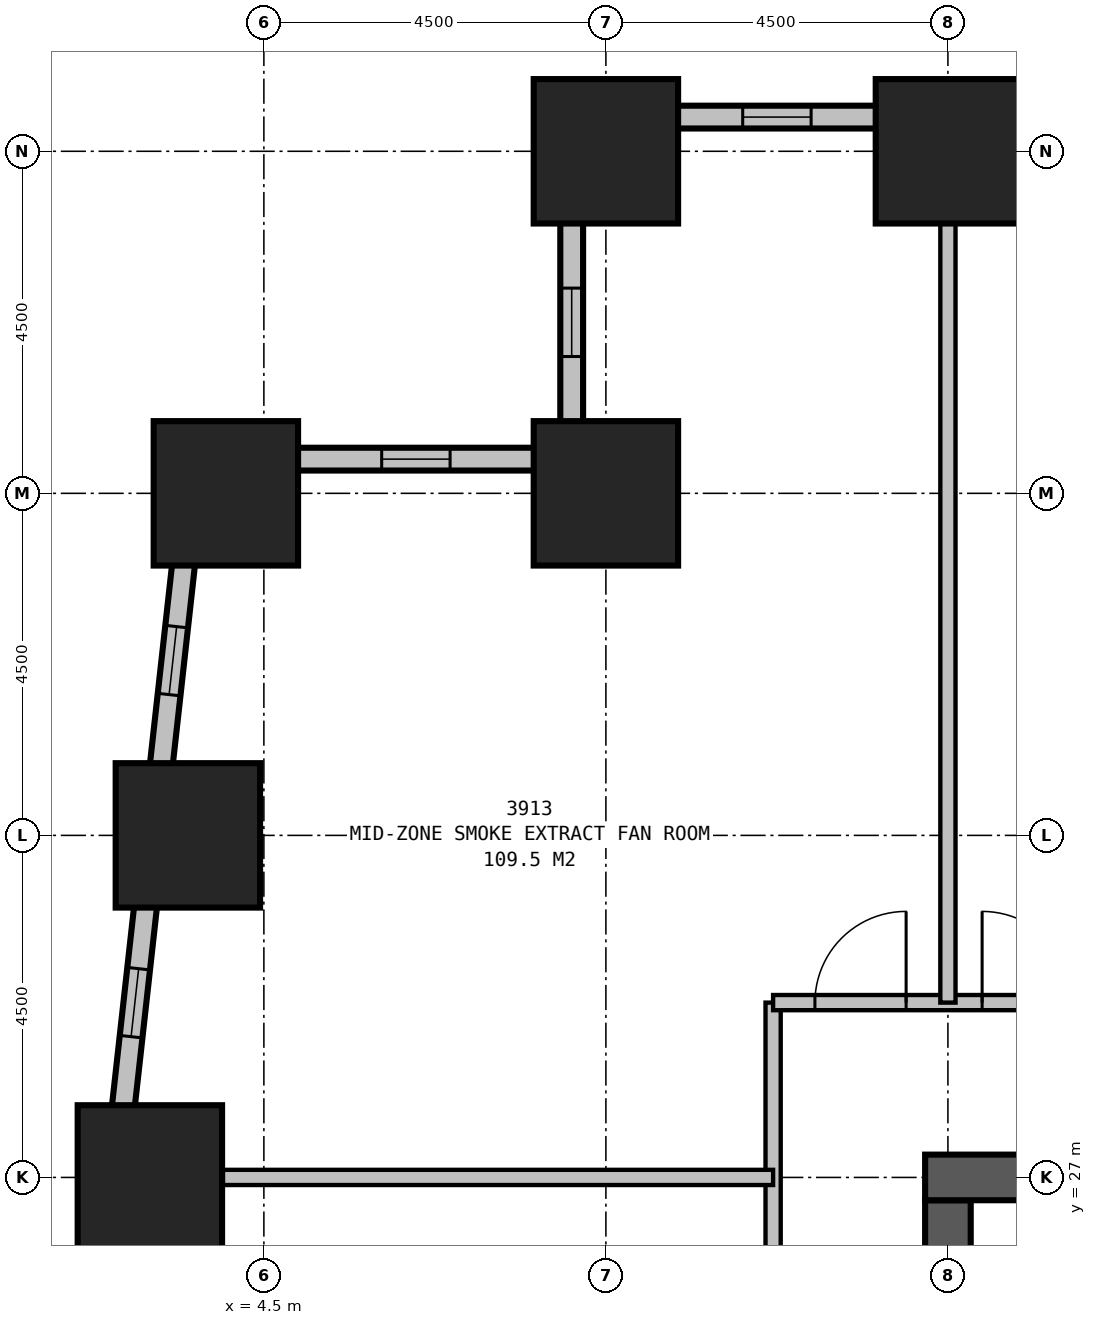
"""IFC4 building model, lengths in metres.
Left out: names, types, materials, properties, quantities, classifications, styles, units other than length and angle.
Written with IfcOpenShell. Run it as: python <this file> out.ifc"""

import sys

from ifc_helpers import new_model, si_unit, direction, frame, frame_2d, origin, origin_2d, place, context, subcontext, project, spatial, rectangle, extrude, element, fill, save


model = new_model("IFC4")
c1 = context("Model", 3, precision=1e-05, world=origin(), true_north=direction((0.0, 1.0)))
c2 = subcontext(c1, "Body", "Model", "MODEL_VIEW")
j1 = project(units=[si_unit("LENGTHUNIT", "METRE"), si_unit("PLANEANGLEUNIT", "RADIAN")], contexts=[c1])
p1 = place(None, origin())
s1 = spatial("IfcSite", under=j1, at=p1, CompositionType="ELEMENT")
p2 = place(p1, origin())
s2 = spatial("IfcBuilding", under=s1, at=p2, CompositionType="ELEMENT")
p3 = place(p2, frame((0.0, 0.0, 151.9)))
s3 = spatial("IfcBuildingStorey", under=s2, at=p3, CompositionType="ELEMENT", Elevation=151.9)
for number, where, z_axis, x_axis in (
    (1, (13.5, 40.5, 0.0), (0.0, 0.0, 1.0), (1.0, 0.0, 0.0)),
    (2, (9.0, 40.5, 0.0), (0.0, 0.0, 1.0), (1.0, 0.0, 0.0)),
    (3, (9.0, 36.0, 0.0), (0.0, 0.0, 1.0), (1.0, 0.0, 0.0)),
    (4, (4.0, 36.0, 0.0), (0.0, 0.0, 1.0), (1.0, 0.0, 0.0)),
    (5, (3.5, 31.5, 0.0), (0.0, 0.0, 1.0), (1.0, 0.0, 0.0)),
    (6, (3.0, 27.0, 0.0), (0.0, 0.0, 1.0), (1.0, 0.0, 0.0)),
):
    element("IfcColumn", number, at=place(p3, frame(where, z_axis=z_axis, x_axis=x_axis)), inside=s3, PredefinedType="COLUMN", context=c2, shape_type="SweptSolid", body=[
        extrude(rectangle(XDim=1.9, YDim=1.9, at=origin_2d()), origin(), (0.0, 0.0, 1.0), 6.0),
    ])
p4 = place(p3, frame((36.3, 27.0, 0.0), z_axis=(0.0, 0.0, 1.0), x_axis=(-1.0, 0.0, 0.0)))
e7 = element("IfcWall", 7, at=p4, inside=s3, PredefinedType="SHEAR", context=c2, shape_type="SweptSolid", body=[
    extrude(rectangle(XDim=23.1, YDim=0.6, at=frame_2d((11.55, 0.0))), origin(), (0.0, 0.0, 1.0), 6.0),
])
p5 = place(p4, frame((17.05, 0.0, 0.0)))
e8 = element("IfcOpeningElement", 8, at=p5, cuts=e7, PredefinedType="OPENING", context=c2, shape_type="SweptSolid", body=[
    extrude(rectangle(XDim=1.0, YDim=2.1, at=frame_2d((0.5, 1.05))), frame((0.0, 0.31, 0.0), z_axis=(0.0, -1.0, 0.0), x_axis=(1.0, 0.0, 0.0)), (0.0, 0.0, 1.0), 0.62),
])
p6 = place(p4, frame((12.05, 0.0, 0.0)))
e9 = element("IfcOpeningElement", 9, at=p6, cuts=e7, PredefinedType="OPENING", context=c2, shape_type="SweptSolid", body=[
    extrude(rectangle(XDim=1.0, YDim=2.1, at=frame_2d((0.5, 1.05))), frame((0.0, 0.31, 0.0), z_axis=(0.0, -1.0, 0.0), x_axis=(1.0, 0.0, 0.0)), (0.0, 0.0, 1.0), 0.62),
])
p7 = place(p4, frame((7.05, 0.0, 0.0)))
e10 = element("IfcOpeningElement", 10, at=p7, cuts=e7, PredefinedType="OPENING", context=c2, shape_type="SweptSolid", body=[
    extrude(rectangle(XDim=1.0, YDim=2.1, at=frame_2d((0.5, 1.05))), frame((0.0, 0.31, 0.0), z_axis=(0.0, -1.0, 0.0), x_axis=(1.0, 0.0, 0.0)), (0.0, 0.0, 1.0), 0.62),
])
p8 = place(p3, frame((13.5, 26.7, 0.0), z_axis=(0.0, 0.0, 1.0), x_axis=(0.0, -1.0, 0.0)))
e11 = element("IfcWall", 11, at=p8, inside=s3, PredefinedType="SHEAR", context=c2, shape_type="SweptSolid", body=[
    extrude(rectangle(XDim=6.7, YDim=0.6, at=frame_2d((3.35, 0.0))), origin(), (0.0, 0.0, 1.0), 6.0),
])
p9 = place(p3, frame((41.1, 40.95, 0.0), z_axis=(0.0, 0.0, 1.0), x_axis=(-1.0, 0.0, 0.0)))
e12 = element("IfcWall", 12, at=p9, inside=s3, PredefinedType="STANDARD", context=c2, shape_type="SweptSolid", body=[
    extrude(rectangle(XDim=32.7, YDim=0.3, at=frame_2d((16.35, 0.0))), origin(), (0.0, 0.0, 1.0), 3.35),
])
p10 = place(p9, frame((2.4, 0.0, 0.5)))
e13 = element("IfcOpeningElement", 13, at=p10, cuts=e12, PredefinedType="OPENING", context=c2, shape_type="SweptSolid", body=[
    extrude(rectangle(XDim=0.9, YDim=1.2, at=frame_2d((0.45, 0.6))), frame((0.0, 0.16, 0.0), z_axis=(0.0, -1.0, 0.0), x_axis=(1.0, 0.0, 0.0)), (0.0, 0.0, 1.0), 0.32),
])
p11 = place(p9, frame((6.9, 0.0, 0.5)))
e14 = element("IfcOpeningElement", 14, at=p11, cuts=e12, PredefinedType="OPENING", context=c2, shape_type="SweptSolid", body=[
    extrude(rectangle(XDim=0.9, YDim=1.2, at=frame_2d((0.45, 0.6))), frame((0.0, 0.16, 0.0), z_axis=(0.0, -1.0, 0.0), x_axis=(1.0, 0.0, 0.0)), (0.0, 0.0, 1.0), 0.32),
])
p12 = place(p9, frame((11.4, 0.0, 0.5)))
e15 = element("IfcOpeningElement", 15, at=p12, cuts=e12, PredefinedType="OPENING", context=c2, shape_type="SweptSolid", body=[
    extrude(rectangle(XDim=0.9, YDim=1.2, at=frame_2d((0.45, 0.6))), frame((0.0, 0.16, 0.0), z_axis=(0.0, -1.0, 0.0), x_axis=(1.0, 0.0, 0.0)), (0.0, 0.0, 1.0), 0.32),
])
p13 = place(p9, frame((15.9, 0.0, 0.5)))
e16 = element("IfcOpeningElement", 16, at=p13, cuts=e12, PredefinedType="OPENING", context=c2, shape_type="SweptSolid", body=[
    extrude(rectangle(XDim=0.9, YDim=1.2, at=frame_2d((0.45, 0.6))), frame((0.0, 0.16, 0.0), z_axis=(0.0, -1.0, 0.0), x_axis=(1.0, 0.0, 0.0)), (0.0, 0.0, 1.0), 0.32),
])
p14 = place(p9, frame((20.4, 0.0, 0.5)))
e17 = element("IfcOpeningElement", 17, at=p14, cuts=e12, PredefinedType="OPENING", context=c2, shape_type="SweptSolid", body=[
    extrude(rectangle(XDim=0.9, YDim=1.2, at=frame_2d((0.45, 0.6))), frame((0.0, 0.16, 0.0), z_axis=(0.0, -1.0, 0.0), x_axis=(1.0, 0.0, 0.0)), (0.0, 0.0, 1.0), 0.32),
])
p15 = place(p9, frame((24.9, 0.0, 0.5)))
e18 = element("IfcOpeningElement", 18, at=p15, cuts=e12, PredefinedType="OPENING", context=c2, shape_type="SweptSolid", body=[
    extrude(rectangle(XDim=0.9, YDim=1.2, at=frame_2d((0.45, 0.6))), frame((0.0, 0.16, 0.0), z_axis=(0.0, -1.0, 0.0), x_axis=(1.0, 0.0, 0.0)), (0.0, 0.0, 1.0), 0.32),
])
p16 = place(p9, frame((29.4, 0.0, 0.5)))
e19 = element("IfcOpeningElement", 19, at=p16, cuts=e12, PredefinedType="OPENING", context=c2, shape_type="SweptSolid", body=[
    extrude(rectangle(XDim=0.9, YDim=1.2, at=frame_2d((0.45, 0.6))), frame((0.0, 0.16, 0.0), z_axis=(0.0, -1.0, 0.0), x_axis=(1.0, 0.0, 0.0)), (0.0, 0.0, 1.0), 0.32),
])
p17 = place(p3, frame((8.55, 41.1, 0.0), z_axis=(0.0, 0.0, 1.0), x_axis=(0.0, -1.0, 0.0)))
e20 = element("IfcWall", 20, at=p17, inside=s3, PredefinedType="STANDARD", context=c2, shape_type="SweptSolid", body=[
    extrude(rectangle(XDim=4.8, YDim=0.3, at=frame_2d((2.4, 0.0))), origin(), (0.0, 0.0, 1.0), 3.35),
])
p18 = place(p17, frame((2.4, 0.0, 0.5)))
e21 = element("IfcOpeningElement", 21, at=p18, cuts=e20, PredefinedType="OPENING", context=c2, shape_type="SweptSolid", body=[
    extrude(rectangle(XDim=0.9, YDim=1.2, at=frame_2d((0.45, 0.6))), frame((0.0, 0.16, 0.0), z_axis=(0.0, -1.0, 0.0), x_axis=(1.0, 0.0, 0.0)), (0.0, 0.0, 1.0), 0.32),
])
p19 = place(p3, frame((8.7, 36.45, 0.0), z_axis=(0.0, 0.0, 1.0), x_axis=(-1.0, 0.0, 0.0)))
e22 = element("IfcWall", 22, at=p19, inside=s3, PredefinedType="STANDARD", context=c2, shape_type="SweptSolid", body=[
    extrude(rectangle(XDim=5.253, YDim=0.3, at=frame_2d((2.626, 0.0))), origin(), (0.0, 0.0, 1.0), 3.35),
])
p20 = place(p19, frame((1.75, 0.0, 0.5)))
e23 = element("IfcOpeningElement", 23, at=p20, cuts=e22, PredefinedType="OPENING", context=c2, shape_type="SweptSolid", body=[
    extrude(rectangle(XDim=0.9, YDim=1.2, at=frame_2d((0.45, 0.6))), frame((0.0, 0.16, 0.0), z_axis=(0.0, -1.0, 0.0), x_axis=(1.0, 0.0, 0.0)), (0.0, 0.0, 1.0), 0.32),
])
p21 = place(p3, frame((3.614, 36.599, 0.0), z_axis=(0.0, 0.0, 1.0), x_axis=(-0.110429082637, -0.993884006164, 0.0)))
e24 = element("IfcWall", 24, at=p21, inside=s3, PredefinedType="STANDARD", context=c2, shape_type="SweptSolid", body=[
    extrude(rectangle(XDim=32.899, YDim=0.3, at=frame_2d((16.45, 0.0))), origin(), (0.0, 0.0, 1.0), 3.35),
])
p22 = place(p21, frame((2.367, 0.0, 0.5)))
e25 = element("IfcOpeningElement", 25, at=p22, cuts=e24, PredefinedType="OPENING", context=c2, shape_type="SweptSolid", body=[
    extrude(rectangle(XDim=0.9, YDim=1.2, at=frame_2d((0.45, 0.6))), frame((0.0, 0.16, 0.0), z_axis=(0.0, -1.0, 0.0), x_axis=(1.0, 0.0, 0.0)), (0.0, 0.0, 1.0), 0.32),
])
p23 = place(p21, frame((6.895, 0.0, 0.5)))
e26 = element("IfcOpeningElement", 26, at=p23, cuts=e24, PredefinedType="OPENING", context=c2, shape_type="SweptSolid", body=[
    extrude(rectangle(XDim=0.9, YDim=1.2, at=frame_2d((0.45, 0.6))), frame((0.0, 0.16, 0.0), z_axis=(0.0, -1.0, 0.0), x_axis=(1.0, 0.0, 0.0)), (0.0, 0.0, 1.0), 0.32),
])
p24 = place(p21, frame((11.422, 0.0, 0.5)))
e27 = element("IfcOpeningElement", 27, at=p24, cuts=e24, PredefinedType="OPENING", context=c2, shape_type="SweptSolid", body=[
    extrude(rectangle(XDim=0.9, YDim=1.2, at=frame_2d((0.45, 0.6))), frame((0.0, 0.16, 0.0), z_axis=(0.0, -1.0, 0.0), x_axis=(1.0, 0.0, 0.0)), (0.0, 0.0, 1.0), 0.32),
])
p25 = place(p21, frame((15.95, 0.0, 0.5)))
e28 = element("IfcOpeningElement", 28, at=p25, cuts=e24, PredefinedType="OPENING", context=c2, shape_type="SweptSolid", body=[
    extrude(rectangle(XDim=0.9, YDim=1.2, at=frame_2d((0.45, 0.6))), frame((0.0, 0.16, 0.0), z_axis=(0.0, -1.0, 0.0), x_axis=(1.0, 0.0, 0.0)), (0.0, 0.0, 1.0), 0.32),
])
p26 = place(p21, frame((20.478, 0.0, 0.5)))
e29 = element("IfcOpeningElement", 29, at=p26, cuts=e24, PredefinedType="OPENING", context=c2, shape_type="SweptSolid", body=[
    extrude(rectangle(XDim=0.9, YDim=1.2, at=frame_2d((0.45, 0.6))), frame((0.0, 0.16, 0.0), z_axis=(0.0, -1.0, 0.0), x_axis=(1.0, 0.0, 0.0)), (0.0, 0.0, 1.0), 0.32),
])
p27 = place(p21, frame((25.005, 0.0, 0.5)))
e30 = element("IfcOpeningElement", 30, at=p27, cuts=e24, PredefinedType="OPENING", context=c2, shape_type="SweptSolid", body=[
    extrude(rectangle(XDim=0.9, YDim=1.2, at=frame_2d((0.45, 0.6))), frame((0.0, 0.16, 0.0), z_axis=(0.0, -1.0, 0.0), x_axis=(1.0, 0.0, 0.0)), (0.0, 0.0, 1.0), 0.32),
])
p28 = place(p21, frame((29.533, 0.0, 0.5)))
e31 = element("IfcOpeningElement", 31, at=p28, cuts=e24, PredefinedType="OPENING", context=c2, shape_type="SweptSolid", body=[
    extrude(rectangle(XDim=0.9, YDim=1.2, at=frame_2d((0.45, 0.6))), frame((0.0, 0.16, 0.0), z_axis=(0.0, -1.0, 0.0), x_axis=(1.0, 0.0, 0.0)), (0.0, 0.0, 1.0), 0.32),
])
p29 = place(p3, frame((11.2, 29.3, 0.0), z_axis=(0.0, 0.0, 1.0), x_axis=(1.0, 0.0, 0.0)))
e32 = element("IfcWall", 32, at=p29, inside=s3, PredefinedType="PARTITIONING", context=c2, shape_type="SweptSolid", body=[
    extrude(rectangle(XDim=27.1, YDim=0.2, at=frame_2d((13.55, 0.0))), origin(), (0.0, 0.0, 1.0), 5.75),
])
p30 = place(p29, frame((2.75, 0.0, 0.0)))
e33 = element("IfcOpeningElement", 33, at=p30, cuts=e32, PredefinedType="OPENING", context=c2, shape_type="SweptSolid", body=[
    extrude(rectangle(XDim=1.2, YDim=2.1, at=frame_2d((0.6, 1.05))), frame((0.0, 0.11, 0.0), z_axis=(0.0, -1.0, 0.0), x_axis=(1.0, 0.0, 0.0)), (0.0, 0.0, 1.0), 0.22),
])
p31 = place(p29, frame((11.75, 0.0, 0.0)))
e34 = element("IfcOpeningElement", 34, at=p31, cuts=e32, PredefinedType="OPENING", context=c2, shape_type="SweptSolid", body=[
    extrude(rectangle(XDim=1.0, YDim=2.1, at=frame_2d((0.5, 1.05))), frame((0.0, 0.11, 0.0), z_axis=(0.0, -1.0, 0.0), x_axis=(1.0, 0.0, 0.0)), (0.0, 0.0, 1.0), 0.22),
])
p32 = place(p29, frame((16.25, 0.0, 0.0)))
e35 = element("IfcOpeningElement", 35, at=p32, cuts=e32, PredefinedType="OPENING", context=c2, shape_type="SweptSolid", body=[
    extrude(rectangle(XDim=1.2, YDim=2.1, at=frame_2d((0.6, 1.05))), frame((0.0, 0.11, 0.0), z_axis=(0.0, -1.0, 0.0), x_axis=(1.0, 0.0, 0.0)), (0.0, 0.0, 1.0), 0.22),
])
p33 = place(p29, frame((0.55, 0.0, 0.0)))
e36 = element("IfcOpeningElement", 36, at=p33, cuts=e32, PredefinedType="OPENING", context=c2, shape_type="SweptSolid", body=[
    extrude(rectangle(XDim=1.2, YDim=2.1, at=frame_2d((0.6, 1.05))), frame((0.0, 0.11, 0.0), z_axis=(0.0, -1.0, 0.0), x_axis=(1.0, 0.0, 0.0)), (0.0, 0.0, 1.0), 0.22),
])
p34 = place(p29, frame((25.35, 0.0, 0.0)))
e37 = element("IfcOpeningElement", 37, at=p34, cuts=e32, PredefinedType="OPENING", context=c2, shape_type="SweptSolid", body=[
    extrude(rectangle(XDim=1.2, YDim=2.1, at=frame_2d((0.6, 1.05))), frame((0.0, 0.11, 0.0), z_axis=(0.0, -1.0, 0.0), x_axis=(1.0, 0.0, 0.0)), (0.0, 0.0, 1.0), 0.22),
])
p35 = place(p3, frame((11.2, 11.2, 0.0), z_axis=(0.0, 0.0, 1.0), x_axis=(0.0, 1.0, 0.0)))
e38 = element("IfcWall", 38, at=p35, inside=s3, PredefinedType="PARTITIONING", context=c2, shape_type="SweptSolid", body=[
    extrude(rectangle(XDim=18.1, YDim=0.2, at=frame_2d((9.05, 0.0))), origin(), (0.0, 0.0, 1.0), 5.75),
])
p36 = place(p35, frame((3.95, 0.0, 0.0)))
e39 = element("IfcOpeningElement", 39, at=p36, cuts=e38, PredefinedType="OPENING", context=c2, shape_type="SweptSolid", body=[
    extrude(rectangle(XDim=1.0, YDim=2.1, at=frame_2d((0.5, 1.05))), frame((0.0, 0.11, 0.0), z_axis=(0.0, -1.0, 0.0), x_axis=(1.0, 0.0, 0.0)), (0.0, 0.0, 1.0), 0.22),
])
p37 = place(p35, frame((7.25, 0.0, 0.0)))
e40 = element("IfcOpeningElement", 40, at=p37, cuts=e38, PredefinedType="OPENING", context=c2, shape_type="SweptSolid", body=[
    extrude(rectangle(XDim=1.2, YDim=2.1, at=frame_2d((0.6, 1.05))), frame((0.0, 0.11, 0.0), z_axis=(0.0, -1.0, 0.0), x_axis=(1.0, 0.0, 0.0)), (0.0, 0.0, 1.0), 0.22),
])
p38 = place(p3, frame((13.5, 29.3, 0.0), z_axis=(0.0, 0.0, 1.0), x_axis=(0.0, 1.0, 0.0)))
e41 = element("IfcWall", 41, at=p38, inside=s3, PredefinedType="PARTITIONING", context=c2, shape_type="SweptSolid", body=[
    extrude(rectangle(XDim=10.25, YDim=0.2, at=frame_2d((5.125, 0.0))), origin(), (0.0, 0.0, 1.0), 4.75),
])
p39 = place(p3, frame((11.2, 27.0, 0.0), z_axis=(0.0, 0.0, 1.0), x_axis=(-1.0, 0.0, 0.0)))
e42 = element("IfcWall", 42, at=p39, inside=s3, PredefinedType="PARTITIONING", context=c2, shape_type="SweptSolid", body=[
    extrude(rectangle(XDim=7.239, YDim=0.2, at=frame_2d((3.62, 0.0))), origin(), (0.0, 0.0, 1.0), 4.45),
])
p40 = place(p16, origin())
e43 = element("IfcWindow", 43, at=p40, inside=s3, PartitioningType="SINGLE_PANEL", PredefinedType="USERDEFINED", context=c2, shape_type="SweptSolid", body=[
    extrude(rectangle(XDim=0.9, YDim=1.2, at=frame_2d((0.45, 0.6))), frame((0.0, 0.03, 0.0), z_axis=(0.0, -1.0, 0.0), x_axis=(1.0, 0.0, 0.0)), (0.0, 0.0, 1.0), 0.06),
])
fill(e19, e43)
p41 = place(p18, origin())
e44 = element("IfcWindow", 44, at=p41, inside=s3, PartitioningType="SINGLE_PANEL", PredefinedType="USERDEFINED", context=c2, shape_type="SweptSolid", body=[
    extrude(rectangle(XDim=0.9, YDim=1.2, at=frame_2d((0.45, 0.6))), frame((0.0, 0.03, 0.0), z_axis=(0.0, -1.0, 0.0), x_axis=(1.0, 0.0, 0.0)), (0.0, 0.0, 1.0), 0.06),
])
fill(e21, e44)
p42 = place(p20, origin())
e45 = element("IfcWindow", 45, at=p42, inside=s3, PartitioningType="SINGLE_PANEL", PredefinedType="USERDEFINED", context=c2, shape_type="SweptSolid", body=[
    extrude(rectangle(XDim=0.9, YDim=1.2, at=frame_2d((0.45, 0.6))), frame((0.0, 0.03, 0.0), z_axis=(0.0, -1.0, 0.0), x_axis=(1.0, 0.0, 0.0)), (0.0, 0.0, 1.0), 0.06),
])
fill(e23, e45)
p43 = place(p22, origin())
e46 = element("IfcWindow", 46, at=p43, inside=s3, PartitioningType="SINGLE_PANEL", PredefinedType="USERDEFINED", context=c2, shape_type="SweptSolid", body=[
    extrude(rectangle(XDim=0.9, YDim=1.2, at=frame_2d((0.45, 0.6))), frame((0.0, 0.03, 0.0), z_axis=(0.0, -1.0, 0.0), x_axis=(1.0, 0.0, 0.0)), (0.0, 0.0, 1.0), 0.06),
])
fill(e25, e46)
p44 = place(p23, origin())
e47 = element("IfcWindow", 47, at=p44, inside=s3, PartitioningType="SINGLE_PANEL", PredefinedType="USERDEFINED", context=c2, shape_type="SweptSolid", body=[
    extrude(rectangle(XDim=0.9, YDim=1.2, at=frame_2d((0.45, 0.6))), frame((0.0, 0.03, 0.0), z_axis=(0.0, -1.0, 0.0), x_axis=(1.0, 0.0, 0.0)), (0.0, 0.0, 1.0), 0.06),
])
fill(e26, e47)
p45 = place(p30, origin())
e48 = element("IfcDoor", 48, at=p45, inside=s3, OperationType="SINGLE_SWING_LEFT", PredefinedType="DOOR", context=c2, shape_type="SweptSolid", body=[
    extrude(rectangle(XDim=1.2, YDim=2.1, at=frame_2d((0.6, 1.05))), frame((0.0, 0.025, 0.0), z_axis=(0.0, -1.0, 0.0), x_axis=(1.0, 0.0, 0.0)), (0.0, 0.0, 1.0), 0.05),
])
fill(e33, e48)
p46 = place(p33, origin())
e49 = element("IfcDoor", 49, at=p46, inside=s3, OperationType="SINGLE_SWING_RIGHT", PredefinedType="DOOR", context=c2, shape_type="SweptSolid", body=[
    extrude(rectangle(XDim=1.2, YDim=2.1, at=frame_2d((0.6, 1.05))), frame((0.0, 0.025, 0.0), z_axis=(0.0, -1.0, 0.0), x_axis=(1.0, 0.0, 0.0)), (0.0, 0.0, 1.0), 0.05),
])
fill(e36, e49)
save(model, sys.argv[1])
